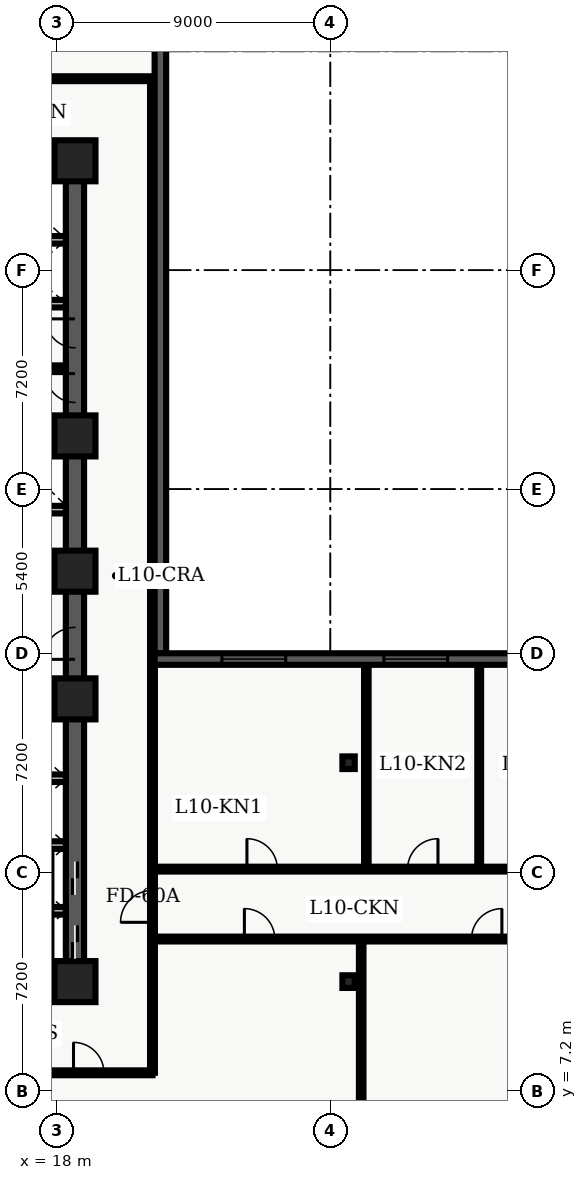
"""IFC4 building model, lengths in metres.
Left out: names, types, materials, properties, quantities, classifications, styles, units other than length and angle.
Written with IfcOpenShell. Run it as: python <this file> out.ifc"""

import sys

from ifc_helpers import new_model, entity, si_unit, converted_unit, direction, frame, origin_with_axes, origin_2d_with_axis, place, context, subcontext, project, spatial, polyline, rectangle, i_section, outline, extrude, element, fill, save


model = new_model("IFC4")
c1 = context("Model", 3, precision=1e-05, world=origin_with_axes(), true_north=direction((0.0, 1.0)))
c2 = subcontext(c1, "Body", "Model", "MODEL_VIEW")
j1 = project(units=[si_unit("LENGTHUNIT", "METRE"), converted_unit("PLANEANGLEUNIT", "DEGREE", entity("IfcPlaneAngleMeasure", 0.017), si_unit("PLANEANGLEUNIT", "RADIAN"), dimensions=[0, 0, 0, 0, 0, 0, 0])], contexts=[c1])
p1 = place(None, origin_with_axes())
s1 = spatial("IfcSite", under=j1, at=p1, CompositionType="ELEMENT")
p2 = place(p1, origin_with_axes())
s2 = spatial("IfcBuilding", under=s1, at=p2, CompositionType="ELEMENT")
p3 = place(p2, frame((0.0, 0.0, 44.4), z_axis=(0.0, 0.0, 1.0), x_axis=(1.0, 0.0, 0.0)))
s3 = spatial("IfcBuildingStorey", under=s2, at=p3, CompositionType="ELEMENT", Elevation=44.4)
p4 = place(p3, frame((11.4, 10.8, 0.0), z_axis=(0.0, 0.0, 1.0), x_axis=(1.0, 0.0, 0.0)))
e1 = element("IfcWall", 1, at=p4, inside=s3, PredefinedType="SHEAR", context=c2, shape_type="SweptSolid", body=[
    extrude(outline(polyline([(0.0, -0.3), (7.2, -0.3), (7.2, 0.3), (0.0, 0.3), (0.0, -0.3)])), origin_with_axes(), (0.0, 0.0, 1.0), 3.66),
])
p5 = place(p4, frame((2.625, 0.0, 0.0), z_axis=(0.0, 0.0, 1.0), x_axis=(1.0, 0.0, 0.0)))
e2 = element("IfcOpeningElement", 2, at=p5, cuts=e1, PredefinedType="OPENING", context=c2, shape_type="SweptSolid", body=[
    extrude(rectangle(XDim=1.05, YDim=0.62, at=origin_2d_with_axis()), origin_with_axes(), (0.0, 0.0, 1.0), 2.15),
])
p6 = place(p3, frame((11.4, 37.8, 0.0), z_axis=(0.0, 0.0, 1.0), x_axis=(1.0, 0.0, 0.0)))
e3 = element("IfcWall", 3, at=p6, inside=s3, PredefinedType="SHEAR", context=c2, shape_type="SweptSolid", body=[
    extrude(outline(polyline([(0.0, -0.3), (7.2, -0.3), (7.2, 0.3), (0.0, 0.3), (0.0, -0.3)])), origin_with_axes(), (0.0, 0.0, 1.0), 3.66),
])
p7 = place(p6, frame((2.625, 0.0, 0.0), z_axis=(0.0, 0.0, 1.0), x_axis=(1.0, 0.0, 0.0)))
e4 = element("IfcOpeningElement", 4, at=p7, cuts=e3, PredefinedType="OPENING", context=c2, shape_type="SweptSolid", body=[
    extrude(rectangle(XDim=1.05, YDim=0.62, at=origin_2d_with_axis()), origin_with_axes(), (0.0, 0.0, 1.0), 2.15),
])
p8 = place(p3, frame((18.6, 10.8, 0.0), z_axis=(0.0, 0.0, 1.0), x_axis=(0.0, 1.0, 0.0)))
e5 = element("IfcWall", 5, at=p8, inside=s3, PredefinedType="SHEAR", context=c2, shape_type="SweptSolid", body=[
    extrude(outline(polyline([(0.0, -0.3), (13.5, -0.3), (13.5, 0.3), (0.0, 0.3), (0.0, -0.3)])), origin_with_axes(), (0.0, 0.0, 1.0), 3.66),
])
p9 = place(p8, frame((1.3, 0.0, 0.0), z_axis=(0.0, 0.0, 1.0), x_axis=(1.0, 0.0, 0.0)))
e6 = element("IfcOpeningElement", 6, at=p9, cuts=e5, PredefinedType="OPENING", context=c2, shape_type="SweptSolid", body=[
    extrude(rectangle(XDim=1.1, YDim=0.62, at=origin_2d_with_axis()), origin_with_axes(), (0.0, 0.0, 1.0), 2.15),
])
p10 = place(p8, frame((3.4, 0.0, 0.0), z_axis=(0.0, 0.0, 1.0), x_axis=(1.0, 0.0, 0.0)))
e7 = element("IfcOpeningElement", 7, at=p10, cuts=e5, PredefinedType="OPENING", context=c2, shape_type="SweptSolid", body=[
    extrude(rectangle(XDim=1.1, YDim=0.62, at=origin_2d_with_axis()), origin_with_axes(), (0.0, 0.0, 1.0), 2.15),
])
p11 = place(p8, frame((11.125, 0.0, 0.0), z_axis=(0.0, 0.0, 1.0), x_axis=(1.0, 0.0, 0.0)))
e8 = element("IfcOpeningElement", 8, at=p11, cuts=e5, PredefinedType="OPENING", context=c2, shape_type="SweptSolid", body=[
    extrude(rectangle(XDim=1.05, YDim=0.62, at=origin_2d_with_axis()), origin_with_axes(), (0.0, 0.0, 1.0), 2.15),
])
p12 = place(p3, frame((18.6, 24.3, 0.0), z_axis=(0.0, 0.0, 1.0), x_axis=(0.0, 1.0, 0.0)))
e9 = element("IfcWall", 9, at=p12, inside=s3, PredefinedType="SHEAR", context=c2, shape_type="SweptSolid", body=[
    extrude(outline(polyline([(0.0, -0.3), (13.5, -0.3), (13.5, 0.3), (0.0, 0.3), (0.0, -0.3)])), origin_with_axes(), (0.0, 0.0, 1.0), 3.66),
])
p13 = place(p12, frame((6.025, 0.0, 0.0), z_axis=(0.0, 0.0, 1.0), x_axis=(1.0, 0.0, 0.0)))
e10 = element("IfcOpeningElement", 10, at=p13, cuts=e9, PredefinedType="OPENING", context=c2, shape_type="SweptSolid", body=[
    extrude(rectangle(XDim=0.95, YDim=0.62, at=origin_2d_with_axis()), origin_with_axes(), (0.0, 0.0, 1.0), 2.15),
])
p14 = place(p12, frame((7.825, 0.0, 0.0), z_axis=(0.0, 0.0, 1.0), x_axis=(1.0, 0.0, 0.0)))
e11 = element("IfcOpeningElement", 11, at=p14, cuts=e9, PredefinedType="OPENING", context=c2, shape_type="SweptSolid", body=[
    extrude(rectangle(XDim=0.95, YDim=0.62, at=origin_2d_with_axis()), origin_with_axes(), (0.0, 0.0, 1.0), 2.15),
])
for number, where, z_axis, x_axis in (
    (12, (11.7, 19.825, 0.0), (0.0, 0.0, 1.0), (1.0, 0.0, 0.0)),
    (13, (11.7, 28.775, 0.0), (0.0, 0.0, 1.0), (1.0, 0.0, 0.0)),
):
    element("IfcWall", number, at=place(p3, frame(where, z_axis=z_axis, x_axis=x_axis)), inside=s3, PredefinedType="SHEAR", context=c2, shape_type="SweptSolid", body=[
        extrude(outline(polyline([(0.0, -0.125), (6.6, -0.125), (6.6, 0.125), (0.0, 0.125), (0.0, -0.125)])), origin_with_axes(), (0.0, 0.0, 1.0), 3.66),
    ])
p15 = place(p3, frame((11.7, 24.1, 0.0), z_axis=(0.0, 0.0, 1.0), x_axis=(1.0, 0.0, 0.0)))
e14 = element("IfcWall", 14, at=p15, inside=s3, PredefinedType="SOLIDWALL", context=c2, shape_type="SweptSolid", body=[
    extrude(outline(polyline([(0.0, -0.125), (6.6, -0.125), (6.6, 0.125), (0.0, 0.125), (0.0, -0.125)])), origin_with_axes(), (0.0, 0.0, 1.0), 2.7),
])
p16 = place(p15, frame((3.6, 0.0, 0.0), z_axis=(0.0, 0.0, 1.0), x_axis=(1.0, 0.0, 0.0)))
e15 = element("IfcOpeningElement", 15, at=p16, cuts=e14, PredefinedType="OPENING", context=c2, shape_type="SweptSolid", body=[
    extrude(rectangle(XDim=0.9, YDim=0.27, at=origin_2d_with_axis()), origin_with_axes(), (0.0, 0.0, 1.0), 2.15),
])
p17 = place(p15, frame((5.65, 0.0, 0.0), z_axis=(0.0, 0.0, 1.0), x_axis=(1.0, 0.0, 0.0)))
e16 = element("IfcOpeningElement", 16, at=p17, cuts=e14, PredefinedType="OPENING", context=c2, shape_type="SweptSolid", body=[
    extrude(rectangle(XDim=0.9, YDim=0.27, at=origin_2d_with_axis()), origin_with_axes(), (0.0, 0.0, 1.0), 2.15),
])
p18 = place(p3, frame((11.7, 26.325, 0.0), z_axis=(0.0, 0.0, 1.0), x_axis=(1.0, 0.0, 0.0)))
e17 = element("IfcWall", 17, at=p18, inside=s3, PredefinedType="SOLIDWALL", context=c2, shape_type="SweptSolid", body=[
    extrude(outline(polyline([(0.0, -0.125), (6.6, -0.125), (6.6, 0.125), (0.0, 0.125), (0.0, -0.125)])), origin_with_axes(), (0.0, 0.0, 1.0), 2.7),
])
p19 = place(p18, frame((3.5, 0.0, 0.0), z_axis=(0.0, 0.0, 1.0), x_axis=(1.0, 0.0, 0.0)))
e18 = element("IfcOpeningElement", 18, at=p19, cuts=e17, PredefinedType="OPENING", context=c2, shape_type="SweptSolid", body=[
    extrude(rectangle(XDim=0.9, YDim=0.27, at=origin_2d_with_axis()), origin_with_axes(), (0.0, 0.0, 1.0), 2.15),
])
for number, where, z_axis, x_axis in (
    (19, (18.6, 10.8, 0.0), (0.0, 0.0, 1.0), (1.0, 0.0, 0.0)),
    (20, (18.6, 20.1, 0.0), (0.0, 0.0, 1.0), (1.0, 0.0, 0.0)),
    (21, (18.6, 24.3, 0.0), (0.0, 0.0, 1.0), (1.0, 0.0, 0.0)),
    (22, (18.6, 28.75, 0.0), (0.0, 0.0, 1.0), (1.0, 0.0, 0.0)),
    (23, (18.6, 37.8, 0.0), (0.0, 0.0, 1.0), (1.0, 0.0, 0.0)),
):
    element("IfcColumn", number, at=place(p3, frame(where, z_axis=z_axis, x_axis=x_axis)), inside=s3, PredefinedType="COLUMN", context=c2, shape_type="SweptSolid", body=[
        extrude(rectangle(XDim=1.35, YDim=1.35, at=origin_2d_with_axis()), origin_with_axes(), (0.0, 0.0, 1.0), 3.9),
    ])
for number, where, z_axis, x_axis in (
    (24, (27.6, 10.8, 0.0), (0.0, 0.0, 1.0), (1.0, 0.0, 0.0)),
    (25, (27.6, 18.0, 0.0), (0.0, 0.0, 1.0), (1.0, 0.0, 0.0)),
):
    element("IfcColumn", number, at=place(p3, frame(where, z_axis=z_axis, x_axis=x_axis)), inside=s3, PredefinedType="COLUMN", context=c2, shape_type="SweptSolid", body=[
        extrude(i_section(OverallWidth=0.406, OverallDepth=0.416, WebThickness=0.03, FlangeThickness=0.048, FilletRadius=0.022, at=origin_2d_with_axis()), origin_with_axes(), (0.0, 0.0, 1.0), 3.9),
    ])
for number, where, z_axis, x_axis in (
    (26, (15.84, 13.13, 0.0), (0.0, 0.0, 1.0), (1.0, 0.0, 0.0)),
    (27, (15.84, 15.29, 0.0), (0.0, 0.0, 1.0), (1.0, 0.0, 0.0)),
    (28, (15.84, 17.49, 0.0), (0.0, 0.0, 1.0), (1.0, 0.0, 0.0)),
    (29, (15.84, 33.1, 0.0), (0.0, 0.0, 1.0), (1.0, 0.0, 0.0)),
    (30, (15.84, 35.2, 0.0), (0.0, 0.0, 1.0), (1.0, 0.0, 0.0)),
):
    element("IfcWall", number, at=place(p3, frame(where, z_axis=z_axis, x_axis=x_axis)), inside=s3, PredefinedType="SOLIDWALL", context=c2, shape_type="SweptSolid", body=[
        extrude(outline(polyline([(0.0, -0.125), (2.46, -0.125), (2.46, 0.125), (0.0, 0.125), (0.0, -0.125)])), origin_with_axes(), (0.0, 0.0, 1.0), 2.7),
    ])
p20 = place(p3, frame((15.84, 31.0, 0.0), z_axis=(0.0, 0.0, 1.0), x_axis=(1.0, 0.0, 0.0)))
e31 = element("IfcWall", 31, at=p20, inside=s3, PredefinedType="PARTITIONING", context=c2, shape_type="SweptSolid", body=[
    extrude(outline(polyline([(0.0, -0.07), (2.46, -0.07), (2.46, 0.07), (0.0, 0.07), (0.0, -0.07)])), origin_with_axes(), (0.0, 0.0, 1.0), 2.7),
])
p21 = place(p3, frame((2.6, 7.8, 0.0), z_axis=(0.0, 0.0, 1.0), x_axis=(1.0, 0.0, 0.0)))
e32 = element("IfcWall", 32, at=p21, inside=s3, PredefinedType="PARTITIONING", context=c2, shape_type="SweptSolid", body=[
    extrude(outline(polyline([(0.0, -0.08), (18.55, -0.08), (18.55, 0.08), (0.0, 0.08), (0.0, -0.08)])), origin_with_axes(), (0.0, 0.0, 1.0), 2.7),
])
p22 = place(p21, frame((2.059, 0.0, 0.0), z_axis=(0.0, 0.0, 1.0), x_axis=(1.0, 0.0, 0.0)))
e33 = element("IfcOpeningElement", 33, at=p22, cuts=e32, PredefinedType="OPENING", context=c2, shape_type="SweptSolid", body=[
    extrude(rectangle(XDim=1.0, YDim=0.18, at=origin_2d_with_axis()), origin_with_axes(), (0.0, 0.0, 1.0), 2.15),
])
p23 = place(p21, frame((10.516, 0.0, 0.0), z_axis=(0.0, 0.0, 1.0), x_axis=(1.0, 0.0, 0.0)))
e34 = element("IfcOpeningElement", 34, at=p23, cuts=e32, PredefinedType="OPENING", context=c2, shape_type="SweptSolid", body=[
    extrude(rectangle(XDim=1.2, YDim=0.18, at=origin_2d_with_axis()), origin_with_axes(), (0.0, 0.0, 1.0), 2.2),
])
p24 = place(p21, frame((16.453, 0.0, 0.0), z_axis=(0.0, 0.0, 1.0), x_axis=(1.0, 0.0, 0.0)))
e35 = element("IfcOpeningElement", 35, at=p24, cuts=e32, PredefinedType="OPENING", context=c2, shape_type="SweptSolid", body=[
    extrude(rectangle(XDim=1.0, YDim=0.18, at=origin_2d_with_axis()), origin_with_axes(), (0.0, 0.0, 1.0), 2.15),
])
p25 = place(p3, frame((2.6, 40.5, 0.0), z_axis=(0.0, 0.0, 1.0), x_axis=(1.0, 0.0, 0.0)))
e36 = element("IfcWall", 36, at=p25, inside=s3, PredefinedType="PARTITIONING", context=c2, shape_type="SweptSolid", body=[
    extrude(outline(polyline([(0.0, -0.08), (18.65, -0.08), (18.65, 0.08), (0.0, 0.08), (0.0, -0.08)])), origin_with_axes(), (0.0, 0.0, 1.0), 2.7),
])
p26 = place(p25, frame((5.275, 0.0, 0.0), z_axis=(0.0, 0.0, 1.0), x_axis=(1.0, 0.0, 0.0)))
e37 = element("IfcOpeningElement", 37, at=p26, cuts=e36, PredefinedType="OPENING", context=c2, shape_type="SweptSolid", body=[
    extrude(rectangle(XDim=1.0, YDim=0.18, at=origin_2d_with_axis()), origin_with_axes(), (0.0, 0.0, 1.0), 2.15),
])
p27 = place(p25, frame((12.61, 0.0, 0.0), z_axis=(0.0, 0.0, 1.0), x_axis=(1.0, 0.0, 0.0)))
e38 = element("IfcOpeningElement", 38, at=p27, cuts=e36, PredefinedType="OPENING", context=c2, shape_type="SweptSolid", body=[
    extrude(rectangle(XDim=1.2, YDim=0.18, at=origin_2d_with_axis()), origin_with_axes(), (0.0, 0.0, 1.0), 2.2),
])
p28 = place(p3, frame((21.15, 7.8, 0.0), z_axis=(0.0, 0.0, 1.0), x_axis=(0.0, 1.0, 0.0)))
e39 = element("IfcWall", 39, at=p28, inside=s3, PredefinedType="PARTITIONING", context=c2, shape_type="SweptSolid", body=[
    extrude(outline(polyline([(0.0, -0.08), (32.7, -0.08), (32.7, 0.08), (0.0, 0.08), (0.0, -0.08)])), origin_with_axes(), (0.0, 0.0, 1.0), 2.7),
])
p29 = place(p28, frame((5.475, 0.0, 0.0), z_axis=(0.0, 0.0, 1.0), x_axis=(1.0, 0.0, 0.0)))
e40 = element("IfcOpeningElement", 40, at=p29, cuts=e39, PredefinedType="OPENING", context=c2, shape_type="SweptSolid", body=[
    extrude(rectangle(XDim=1.05, YDim=0.18, at=origin_2d_with_axis()), origin_with_axes(), (0.0, 0.0, 1.0), 2.15),
])
p30 = place(p3, frame((21.15, 12.2, 0.0), z_axis=(0.0, 0.0, 1.0), x_axis=(1.0, 0.0, 0.0)))
e41 = element("IfcWall", 41, at=p30, inside=s3, PredefinedType="PARTITIONING", context=c2, shape_type="SweptSolid", body=[
    extrude(outline(polyline([(0.0, -0.08), (15.2, -0.08), (15.2, 0.08), (0.0, 0.08), (0.0, -0.08)])), origin_with_axes(), (0.0, 0.0, 1.0), 2.7),
])
p31 = place(p30, frame((3.522, 0.0, 0.0), z_axis=(0.0, 0.0, 1.0), x_axis=(1.0, 0.0, 0.0)))
e42 = element("IfcOpeningElement", 42, at=p31, cuts=e41, PredefinedType="OPENING", context=c2, shape_type="SweptSolid", body=[
    extrude(rectangle(XDim=1.0, YDim=0.18, at=origin_2d_with_axis()), origin_with_axes(), (0.0, 0.0, 1.0), 2.15),
])
p32 = place(p30, frame((10.992, 0.0, 0.0), z_axis=(0.0, 0.0, 1.0), x_axis=(1.0, 0.0, 0.0)))
e43 = element("IfcOpeningElement", 43, at=p32, cuts=e41, PredefinedType="OPENING", context=c2, shape_type="SweptSolid", body=[
    extrude(rectangle(XDim=1.0, YDim=0.18, at=origin_2d_with_axis()), origin_with_axes(), (0.0, 0.0, 1.0), 2.15),
])
p33 = place(p3, frame((21.15, 14.5, 0.0), z_axis=(0.0, 0.0, 1.0), x_axis=(1.0, 0.0, 0.0)))
e44 = element("IfcWall", 44, at=p33, inside=s3, PredefinedType="PARTITIONING", context=c2, shape_type="SweptSolid", body=[
    extrude(outline(polyline([(0.0, -0.08), (15.2, -0.08), (15.2, 0.08), (0.0, 0.08), (0.0, -0.08)])), origin_with_axes(), (0.0, 0.0, 1.0), 2.7),
])
p34 = place(p33, frame((3.607, 0.0, 0.0), z_axis=(0.0, 0.0, 1.0), x_axis=(1.0, 0.0, 0.0)))
e45 = element("IfcOpeningElement", 45, at=p34, cuts=e44, PredefinedType="OPENING", context=c2, shape_type="SweptSolid", body=[
    extrude(rectangle(XDim=1.0, YDim=0.18, at=origin_2d_with_axis()), origin_with_axes(), (0.0, 0.0, 1.0), 2.15),
])
p35 = place(p33, frame((8.89, 0.0, 0.0), z_axis=(0.0, 0.0, 1.0), x_axis=(1.0, 0.0, 0.0)))
e46 = element("IfcOpeningElement", 46, at=p35, cuts=e44, PredefinedType="OPENING", context=c2, shape_type="SweptSolid", body=[
    extrude(rectangle(XDim=1.0, YDim=0.18, at=origin_2d_with_axis()), origin_with_axes(), (0.0, 0.0, 1.0), 2.15),
])
p36 = place(p33, frame((12.933, 0.0, 0.0), z_axis=(0.0, 0.0, 1.0), x_axis=(1.0, 0.0, 0.0)))
e47 = element("IfcOpeningElement", 47, at=p36, cuts=e44, PredefinedType="OPENING", context=c2, shape_type="SweptSolid", body=[
    extrude(rectangle(XDim=1.0, YDim=0.18, at=origin_2d_with_axis()), origin_with_axes(), (0.0, 0.0, 1.0), 2.15),
])
p37 = place(p3, frame((28.015, 0.36, 0.0), z_axis=(0.0, 0.0, 1.0), x_axis=(0.0, 1.0, 0.0)))
e48 = element("IfcWall", 48, at=p37, inside=s3, PredefinedType="PARTITIONING", context=c2, shape_type="SweptSolid", body=[
    extrude(outline(polyline([(0.0, -0.075), (11.72, -0.075), (11.72, 0.075), (0.0, 0.075), (0.0, -0.075)])), origin_with_axes(), (0.0, 0.0, 1.0), 2.7),
])
p38 = place(p3, frame((28.184, 14.62, 0.0), z_axis=(0.0, 0.0, 1.0), x_axis=(0.0, 1.0, 0.0)))
e49 = element("IfcWall", 49, at=p38, inside=s3, PredefinedType="PARTITIONING", context=c2, shape_type="SweptSolid", body=[
    extrude(outline(polyline([(0.0, -0.075), (6.605, -0.075), (6.605, 0.075), (0.0, 0.075), (0.0, -0.075)])), origin_with_axes(), (0.0, 0.0, 1.0), 2.7),
])
p39 = place(p3, frame((31.896, 14.62, 0.0), z_axis=(0.0, 0.0, 1.0), x_axis=(0.0, 1.0, 0.0)))
e50 = element("IfcWall", 50, at=p39, inside=s3, PredefinedType="PARTITIONING", context=c2, shape_type="SweptSolid", body=[
    extrude(outline(polyline([(0.0, -0.062), (6.605, -0.062), (6.605, 0.062), (0.0, 0.062), (0.0, -0.062)])), origin_with_axes(), (0.0, 0.0, 1.0), 2.7),
])
p40 = place(p3, frame((21.41, 45.82, 0.0), z_axis=(0.0, 0.0, 1.0), x_axis=(0.0, -1.0, 0.0)))
e51 = element("IfcWall", 51, at=p40, inside=s3, PredefinedType="SOLIDWALL", context=c2, shape_type="SweptSolid", body=[
    extrude(outline(polyline([(0.0, -0.19), (24.22, -0.19), (24.22, 0.19), (0.0, 0.19), (0.0, -0.19)])), origin_with_axes(), (0.0, 0.0, 1.0), 3.66),
])
p41 = place(p40, frame((2.902, 0.0, 0.45), z_axis=(0.0, 0.0, 1.0), x_axis=(1.0, 0.0, 0.0)))
e52 = element("IfcOpeningElement", 52, at=p41, cuts=e51, PredefinedType="OPENING", context=c2, shape_type="SweptSolid", body=[
    extrude(rectangle(XDim=2.1, YDim=0.4, at=origin_2d_with_axis()), origin_with_axes(), (0.0, 0.0, 1.0), 2.2),
])
p42 = place(p3, frame((21.22, 21.41, 0.0), z_axis=(0.0, 0.0, 1.0), x_axis=(1.0, 0.0, 0.0)))
e53 = element("IfcWall", 53, at=p42, inside=s3, PredefinedType="SOLIDWALL", context=c2, shape_type="SweptSolid", body=[
    extrude(outline(polyline([(0.0, -0.19), (17.18, -0.19), (17.18, 0.19), (0.0, 0.19), (0.0, -0.19)])), origin_with_axes(), (0.0, 0.0, 1.0), 3.66),
])
p43 = place(p42, frame((3.263, 0.0, 0.45), z_axis=(0.0, 0.0, 1.0), x_axis=(1.0, 0.0, 0.0)))
e54 = element("IfcOpeningElement", 54, at=p43, cuts=e53, PredefinedType="OPENING", context=c2, shape_type="SweptSolid", body=[
    extrude(rectangle(XDim=2.1, YDim=0.4, at=origin_2d_with_axis()), origin_with_axes(), (0.0, 0.0, 1.0), 2.2),
])
p44 = place(p42, frame((8.59, 0.0, 0.45), z_axis=(0.0, 0.0, 1.0), x_axis=(1.0, 0.0, 0.0)))
e55 = element("IfcOpeningElement", 55, at=p44, cuts=e53, PredefinedType="OPENING", context=c2, shape_type="SweptSolid", body=[
    extrude(rectangle(XDim=2.1, YDim=0.4, at=origin_2d_with_axis()), origin_with_axes(), (0.0, 0.0, 1.0), 2.2),
])
p45 = place(p42, frame((13.467, 0.0, 0.45), z_axis=(0.0, 0.0, 1.0), x_axis=(1.0, 0.0, 0.0)))
e56 = element("IfcOpeningElement", 56, at=p45, cuts=e53, PredefinedType="OPENING", context=c2, shape_type="SweptSolid", body=[
    extrude(rectangle(XDim=2.1, YDim=0.4, at=origin_2d_with_axis()), origin_with_axes(), (0.0, 0.0, 1.0), 2.2),
])
p46 = place(p8, frame((1.3, 0.0, 0.0), z_axis=(0.0, 0.0, 1.0), x_axis=(1.0, 0.0, 0.0)))
e57 = element("IfcDoor", 57, at=p46, inside=s3, OperationType="SLIDING_TO_LEFT", PredefinedType="DOOR", context=c2, shape_type="SweptSolid", body=[
    extrude(rectangle(XDim=1.1, YDim=0.09, at=origin_2d_with_axis()), origin_with_axes(), (0.0, 0.0, 1.0), 2.15),
])
fill(e6, e57)
p47 = place(p8, frame((3.4, 0.0, 0.0), z_axis=(0.0, 0.0, 1.0), x_axis=(1.0, 0.0, 0.0)))
e58 = element("IfcDoor", 58, at=p47, inside=s3, OperationType="SLIDING_TO_RIGHT", PredefinedType="DOOR", context=c2, shape_type="SweptSolid", body=[
    extrude(rectangle(XDim=1.1, YDim=0.09, at=origin_2d_with_axis()), origin_with_axes(), (0.0, 0.0, 1.0), 2.15),
])
fill(e7, e58)
p48 = place(p8, frame((11.125, 0.0, 0.0), z_axis=(0.0, 0.0, 1.0), x_axis=(1.0, 0.0, 0.0)))
e59 = element("IfcDoor", 59, at=p48, inside=s3, OperationType="SINGLE_SWING_LEFT", PredefinedType="DOOR", context=c2, shape_type="SweptSolid", body=[
    extrude(rectangle(XDim=1.05, YDim=0.09, at=origin_2d_with_axis()), origin_with_axes(), (0.0, 0.0, 1.0), 2.15),
])
fill(e8, e59)
p49 = place(p12, frame((6.025, 0.0, 0.0), z_axis=(0.0, 0.0, 1.0), x_axis=(1.0, 0.0, 0.0)))
e60 = element("IfcDoor", 60, at=p49, inside=s3, OperationType="SINGLE_SWING_RIGHT", PredefinedType="DOOR", context=c2, shape_type="SweptSolid", body=[
    extrude(rectangle(XDim=0.95, YDim=0.09, at=origin_2d_with_axis()), origin_with_axes(), (0.0, 0.0, 1.0), 2.15),
])
fill(e10, e60)
p50 = place(p12, frame((7.825, 0.0, 0.0), z_axis=(0.0, 0.0, 1.0), x_axis=(1.0, 0.0, 0.0)))
e61 = element("IfcDoor", 61, at=p50, inside=s3, OperationType="SINGLE_SWING_RIGHT", PredefinedType="DOOR", context=c2, shape_type="SweptSolid", body=[
    extrude(rectangle(XDim=0.95, YDim=0.09, at=origin_2d_with_axis()), origin_with_axes(), (0.0, 0.0, 1.0), 2.15),
])
fill(e11, e61)
p51 = place(p21, frame((16.453, 0.0, 0.0), z_axis=(0.0, 0.0, 1.0), x_axis=(1.0, 0.0, 0.0)))
e62 = element("IfcDoor", 62, at=p51, inside=s3, OperationType="SINGLE_SWING_LEFT", PredefinedType="DOOR", context=c2, shape_type="SweptSolid", body=[
    extrude(rectangle(XDim=1.0, YDim=0.09, at=origin_2d_with_axis()), origin_with_axes(), (0.0, 0.0, 1.0), 2.15),
])
fill(e35, e62)
p52 = place(p28, frame((5.475, 0.0, 0.0), z_axis=(0.0, 0.0, 1.0), x_axis=(1.0, 0.0, 0.0)))
e63 = element("IfcDoor", 63, at=p52, inside=s3, OperationType="SINGLE_SWING_LEFT", PredefinedType="DOOR", context=c2, shape_type="SweptSolid", body=[
    extrude(rectangle(XDim=1.05, YDim=0.09, at=origin_2d_with_axis()), origin_with_axes(), (0.0, 0.0, 1.0), 2.15),
])
fill(e40, e63)
p53 = place(p30, frame((3.522, 0.0, 0.0), z_axis=(0.0, 0.0, 1.0), x_axis=(1.0, 0.0, 0.0)))
e64 = element("IfcDoor", 64, at=p53, inside=s3, OperationType="SINGLE_SWING_LEFT", PredefinedType="DOOR", context=c2, shape_type="SweptSolid", body=[
    extrude(rectangle(XDim=1.0, YDim=0.09, at=origin_2d_with_axis()), origin_with_axes(), (0.0, 0.0, 1.0), 2.15),
])
fill(e42, e64)
p54 = place(p30, frame((10.992, 0.0, 0.0), z_axis=(0.0, 0.0, 1.0), x_axis=(1.0, 0.0, 0.0)))
e65 = element("IfcDoor", 65, at=p54, inside=s3, OperationType="SINGLE_SWING_RIGHT", PredefinedType="DOOR", context=c2, shape_type="SweptSolid", body=[
    extrude(rectangle(XDim=1.0, YDim=0.09, at=origin_2d_with_axis()), origin_with_axes(), (0.0, 0.0, 1.0), 2.15),
])
fill(e43, e65)
p55 = place(p33, frame((3.607, 0.0, 0.0), z_axis=(0.0, 0.0, 1.0), x_axis=(1.0, 0.0, 0.0)))
e66 = element("IfcDoor", 66, at=p55, inside=s3, OperationType="SINGLE_SWING_LEFT", PredefinedType="DOOR", context=c2, shape_type="SweptSolid", body=[
    extrude(rectangle(XDim=1.0, YDim=0.09, at=origin_2d_with_axis()), origin_with_axes(), (0.0, 0.0, 1.0), 2.15),
])
fill(e45, e66)
p56 = place(p33, frame((8.89, 0.0, 0.0), z_axis=(0.0, 0.0, 1.0), x_axis=(1.0, 0.0, 0.0)))
e67 = element("IfcDoor", 67, at=p56, inside=s3, OperationType="SINGLE_SWING_RIGHT", PredefinedType="DOOR", context=c2, shape_type="SweptSolid", body=[
    extrude(rectangle(XDim=1.0, YDim=0.09, at=origin_2d_with_axis()), origin_with_axes(), (0.0, 0.0, 1.0), 2.15),
])
fill(e46, e67)
p57 = place(p42, frame((3.263, 0.0, 0.45), z_axis=(0.0, 0.0, 1.0), x_axis=(1.0, 0.0, 0.0)))
e68 = element("IfcWindow", 68, at=p57, inside=s3, PredefinedType="WINDOW", context=c2, shape_type="SweptSolid", body=[
    extrude(rectangle(XDim=2.1, YDim=0.09, at=origin_2d_with_axis()), origin_with_axes(), (0.0, 0.0, 1.0), 2.2),
])
fill(e54, e68)
p58 = place(p42, frame((8.59, 0.0, 0.45), z_axis=(0.0, 0.0, 1.0), x_axis=(1.0, 0.0, 0.0)))
e69 = element("IfcWindow", 69, at=p58, inside=s3, PredefinedType="WINDOW", context=c2, shape_type="SweptSolid", body=[
    extrude(rectangle(XDim=2.1, YDim=0.09, at=origin_2d_with_axis()), origin_with_axes(), (0.0, 0.0, 1.0), 2.2),
])
fill(e55, e69)
save(model, sys.argv[1])
